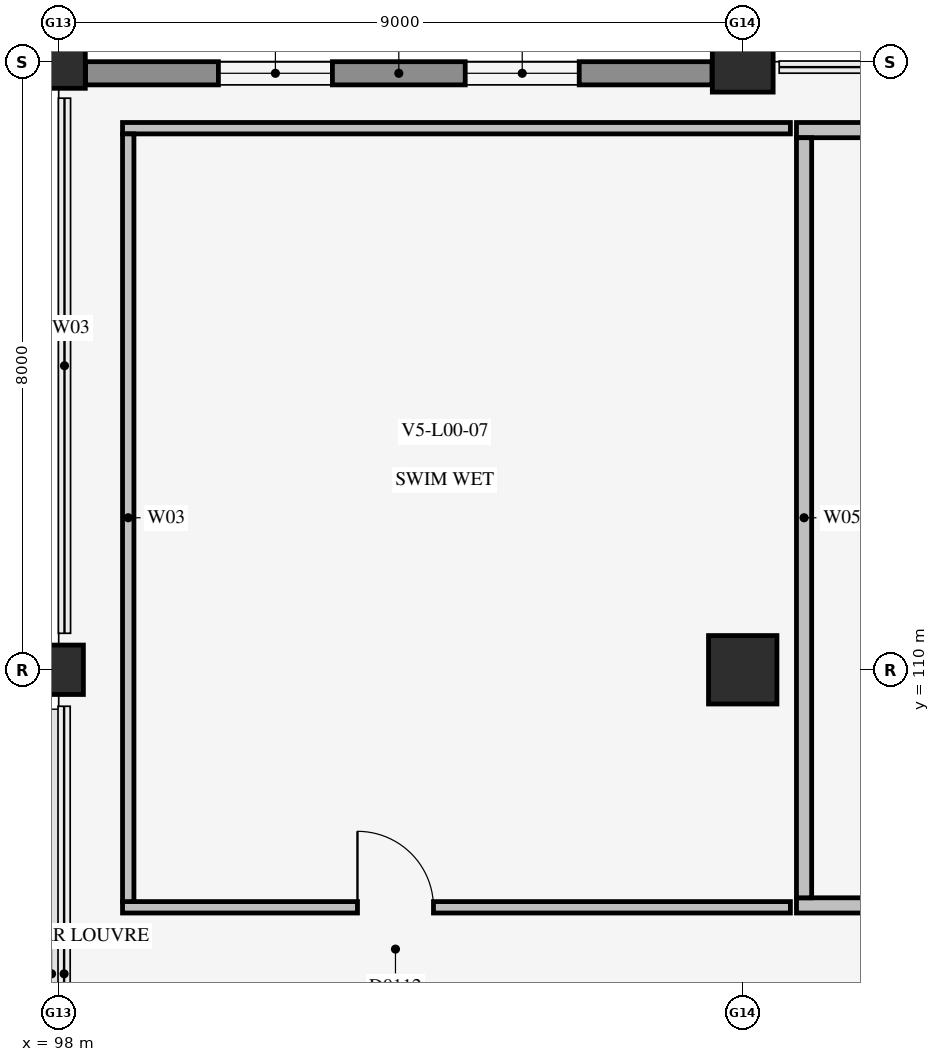
"""IFC4 building model, lengths in metres.
Left out: names, types, materials, properties, quantities, classifications, styles, units other than length and angle.
Written with IfcOpenShell. Run it as: python <this file> out.ifc"""

import sys

from ifc_helpers import new_model, si_unit, direction, frame, frame_2d, origin, origin_2d, place, context, subcontext, project, spatial, rectangle, extrude, element, fill, save


model = new_model("IFC4")
c1 = context("Model", 3, precision=1e-05, world=origin(), true_north=direction((0.0, 1.0)))
c2 = subcontext(c1, "Body", "Model", "MODEL_VIEW")
j1 = project(units=[si_unit("LENGTHUNIT", "METRE"), si_unit("PLANEANGLEUNIT", "RADIAN")], contexts=[c1])
p1 = place(None, origin())
s1 = spatial("IfcSite", under=j1, at=p1, CompositionType="ELEMENT")
p2 = place(p1, origin())
s2 = spatial("IfcBuilding", under=s1, at=p2, CompositionType="ELEMENT")
p3 = place(p2, origin())
s3 = spatial("IfcBuildingStorey", under=s2, at=p3, CompositionType="ELEMENT", Elevation=0.0)
p4 = place(p3, frame((98.0, 110.0, 0.0), z_axis=(0.0, 0.0, 1.0), x_axis=(1.0, 0.0, 0.0)))
e1 = element("IfcColumn", 1, at=p4, inside=s3, PredefinedType="COLUMN", context=c2, shape_type="SweptSolid", body=[
    extrude(rectangle(XDim=0.65, YDim=0.65, at=origin_2d()), origin(), (0.0, 0.0, 1.0), 5.4),
])
p5 = place(p3, frame((98.0, 118.0, 0.0), z_axis=(0.0, 0.0, 1.0), x_axis=(1.0, 0.0, 0.0)))
e2 = element("IfcColumn", 2, at=p5, inside=s3, PredefinedType="COLUMN", context=c2, shape_type="SweptSolid", body=[
    extrude(rectangle(XDim=0.7, YDim=0.7, at=origin_2d()), origin(), (0.0, 0.0, 1.0), 5.4),
])
p6 = place(p3, frame((107.0, 110.0, 0.0), z_axis=(0.0, 0.0, 1.0), x_axis=(1.0, 0.0, 0.0)))
e3 = element("IfcColumn", 3, at=p6, inside=s3, PredefinedType="COLUMN", context=c2, shape_type="SweptSolid", body=[
    extrude(rectangle(XDim=0.9, YDim=0.9, at=origin_2d()), origin(), (0.0, 0.0, 1.0), 5.4),
])
p7 = place(p3, frame((107.0, 118.0, 0.0), z_axis=(0.0, 0.0, 1.0), x_axis=(1.0, 0.0, 0.0)))
e4 = element("IfcColumn", 4, at=p7, inside=s3, PredefinedType="COLUMN", context=c2, shape_type="SweptSolid", body=[
    extrude(rectangle(XDim=0.8, YDim=0.8, at=origin_2d()), origin(), (0.0, 0.0, 1.0), 5.4),
])
p8 = place(p3, frame((98.84, 106.875, 0.0), z_axis=(0.0, 0.0, 1.0), x_axis=(1.0, 0.0, 0.0)))
e5 = element("IfcWall", 5, at=p8, inside=s3, PredefinedType="PARTITIONING", context=c2, shape_type="SweptSolid", body=[
    extrude(rectangle(XDim=8.787, YDim=0.15, at=frame_2d((4.394, 0.0))), origin(), (0.0, 0.0, 1.0), 5.125),
])
p9 = place(p8, frame((3.091, 0.0, 0.0)))
e6 = element("IfcOpeningElement", 6, at=p9, cuts=e5, PredefinedType="OPENING", context=c2, shape_type="SweptSolid", body=[
    extrude(rectangle(XDim=1.0, YDim=2.2, at=frame_2d((0.5, 1.1))), frame((0.0, 0.087, 0.0), z_axis=(0.0, -1.0, 0.0), x_axis=(1.0, 0.0, 0.0)), (0.0, 0.0, 1.0), 0.174),
])
p10 = place(p3, frame((98.84, 117.125, 0.0), z_axis=(0.0, 0.0, 1.0), x_axis=(1.0, 0.0, 0.0)))
e7 = element("IfcWall", 7, at=p10, inside=s3, PredefinedType="PARTITIONING", context=c2, shape_type="SweptSolid", body=[
    extrude(rectangle(XDim=8.787, YDim=0.15, at=frame_2d((4.394, 0.0))), origin(), (0.0, 0.0, 1.0), 5.125),
])
p11 = place(p3, frame((98.915, 106.95, 0.0), z_axis=(0.0, 0.0, 1.0), x_axis=(0.0, 1.0, 0.0)))
e8 = element("IfcWall", 8, at=p11, inside=s3, PredefinedType="PARTITIONING", context=c2, shape_type="SweptSolid", body=[
    extrude(rectangle(XDim=10.1, YDim=0.15, at=frame_2d((5.05, 0.0))), origin(), (0.0, 0.0, 1.0), 5.125),
])
p12 = place(p3, frame((107.707, 106.9, 0.0), z_axis=(0.0, 0.0, 1.0), x_axis=(1.0, 0.0, 0.0)))
e9 = element("IfcWall", 9, at=p12, inside=s3, PredefinedType="PLUMBINGWALL", context=c2, shape_type="SweptSolid", body=[
    extrude(rectangle(XDim=8.786, YDim=0.2, at=frame_2d((4.393, 0.0))), origin(), (0.0, 0.0, 1.0), 5.125),
])
p13 = place(p12, frame((3.129, 0.0, 0.0)))
e10 = element("IfcOpeningElement", 10, at=p13, cuts=e9, PredefinedType="OPENING", context=c2, shape_type="SweptSolid", body=[
    extrude(rectangle(XDim=0.9, YDim=2.1, at=frame_2d((0.45, 1.05))), frame((0.0, 0.112, 0.0), z_axis=(0.0, -1.0, 0.0), x_axis=(1.0, 0.0, 0.0)), (0.0, 0.0, 1.0), 0.224),
])
p14 = place(p3, frame((107.707, 117.1, 0.0), z_axis=(0.0, 0.0, 1.0), x_axis=(1.0, 0.0, 0.0)))
e11 = element("IfcWall", 11, at=p14, inside=s3, PredefinedType="PLUMBINGWALL", context=c2, shape_type="SweptSolid", body=[
    extrude(rectangle(XDim=8.786, YDim=0.2, at=frame_2d((4.393, 0.0))), origin(), (0.0, 0.0, 1.0), 5.125),
])
p15 = place(p3, frame((107.807, 107.0, 0.0), z_axis=(0.0, 0.0, 1.0), x_axis=(0.0, 1.0, 0.0)))
e12 = element("IfcWall", 12, at=p15, inside=s3, PredefinedType="PLUMBINGWALL", context=c2, shape_type="SweptSolid", body=[
    extrude(rectangle(XDim=10.0, YDim=0.2, at=frame_2d((5.0, 0.0))), origin(), (0.0, 0.0, 1.0), 5.125),
])
p16 = place(p3, frame((98.354, 117.847, 0.0), z_axis=(0.0, 0.0, 1.0), x_axis=(1.0, 0.0, 0.0)))
e13 = element("IfcWall", 13, at=p16, inside=s3, PredefinedType="SOLIDWALL", context=c2, shape_type="SweptSolid", body=[
    extrude(rectangle(XDim=8.242, YDim=0.305, at=frame_2d((4.121, 0.0))), origin(), (0.0, 0.0, 1.0), 4.65),
])
p17 = place(p16, frame((1.747, 0.0, 0.95)))
e14 = element("IfcOpeningElement", 14, at=p17, cuts=e13, PredefinedType="OPENING", context=c2, shape_type="SweptSolid", body=[
    extrude(rectangle(XDim=1.5, YDim=1.2, at=frame_2d((0.75, 0.6))), frame((0.0, 0.165, 0.0), z_axis=(0.0, -1.0, 0.0), x_axis=(1.0, 0.0, 0.0)), (0.0, 0.0, 1.0), 0.329),
])
p18 = place(p16, frame((4.995, 0.0, 0.95)))
e15 = element("IfcOpeningElement", 15, at=p18, cuts=e13, PredefinedType="OPENING", context=c2, shape_type="SweptSolid", body=[
    extrude(rectangle(XDim=1.5, YDim=1.2, at=frame_2d((0.75, 0.6))), frame((0.0, 0.165, 0.0), z_axis=(0.0, -1.0, 0.0), x_axis=(1.0, 0.0, 0.0)), (0.0, 0.0, 1.0), 0.329),
])
p19 = place(p9, origin())
e16 = element("IfcDoor", 16, at=p19, inside=s3, OperationType="SINGLE_SWING_LEFT", PredefinedType="DOOR", context=c2, shape_type="SweptSolid", body=[
    extrude(rectangle(XDim=1.0, YDim=2.2, at=frame_2d((0.5, 1.1))), frame((0.0, 0.025, 0.0), z_axis=(0.0, -1.0, 0.0), x_axis=(1.0, 0.0, 0.0)), (0.0, 0.0, 1.0), 0.05),
])
fill(e6, e16)
p20 = place(p17, origin())
e17 = element("IfcWindow", 17, at=p20, inside=s3, PartitioningType="SINGLE_PANEL", PredefinedType="WINDOW", context=c2, shape_type="SweptSolid", body=[
    extrude(rectangle(XDim=1.5, YDim=1.2, at=frame_2d((0.75, 0.6))), frame((0.0, 0.03, 0.0), z_axis=(0.0, -1.0, 0.0), x_axis=(1.0, 0.0, 0.0)), (0.0, 0.0, 1.0), 0.06),
])
fill(e14, e17)
p21 = place(p18, origin())
e18 = element("IfcWindow", 18, at=p21, inside=s3, PartitioningType="SINGLE_PANEL", PredefinedType="WINDOW", context=c2, shape_type="SweptSolid", body=[
    extrude(rectangle(XDim=1.5, YDim=1.2, at=frame_2d((0.75, 0.6))), frame((0.0, 0.03, 0.0), z_axis=(0.0, -1.0, 0.0), x_axis=(1.0, 0.0, 0.0)), (0.0, 0.0, 1.0), 0.06),
])
fill(e15, e18)
save(model, sys.argv[1])
